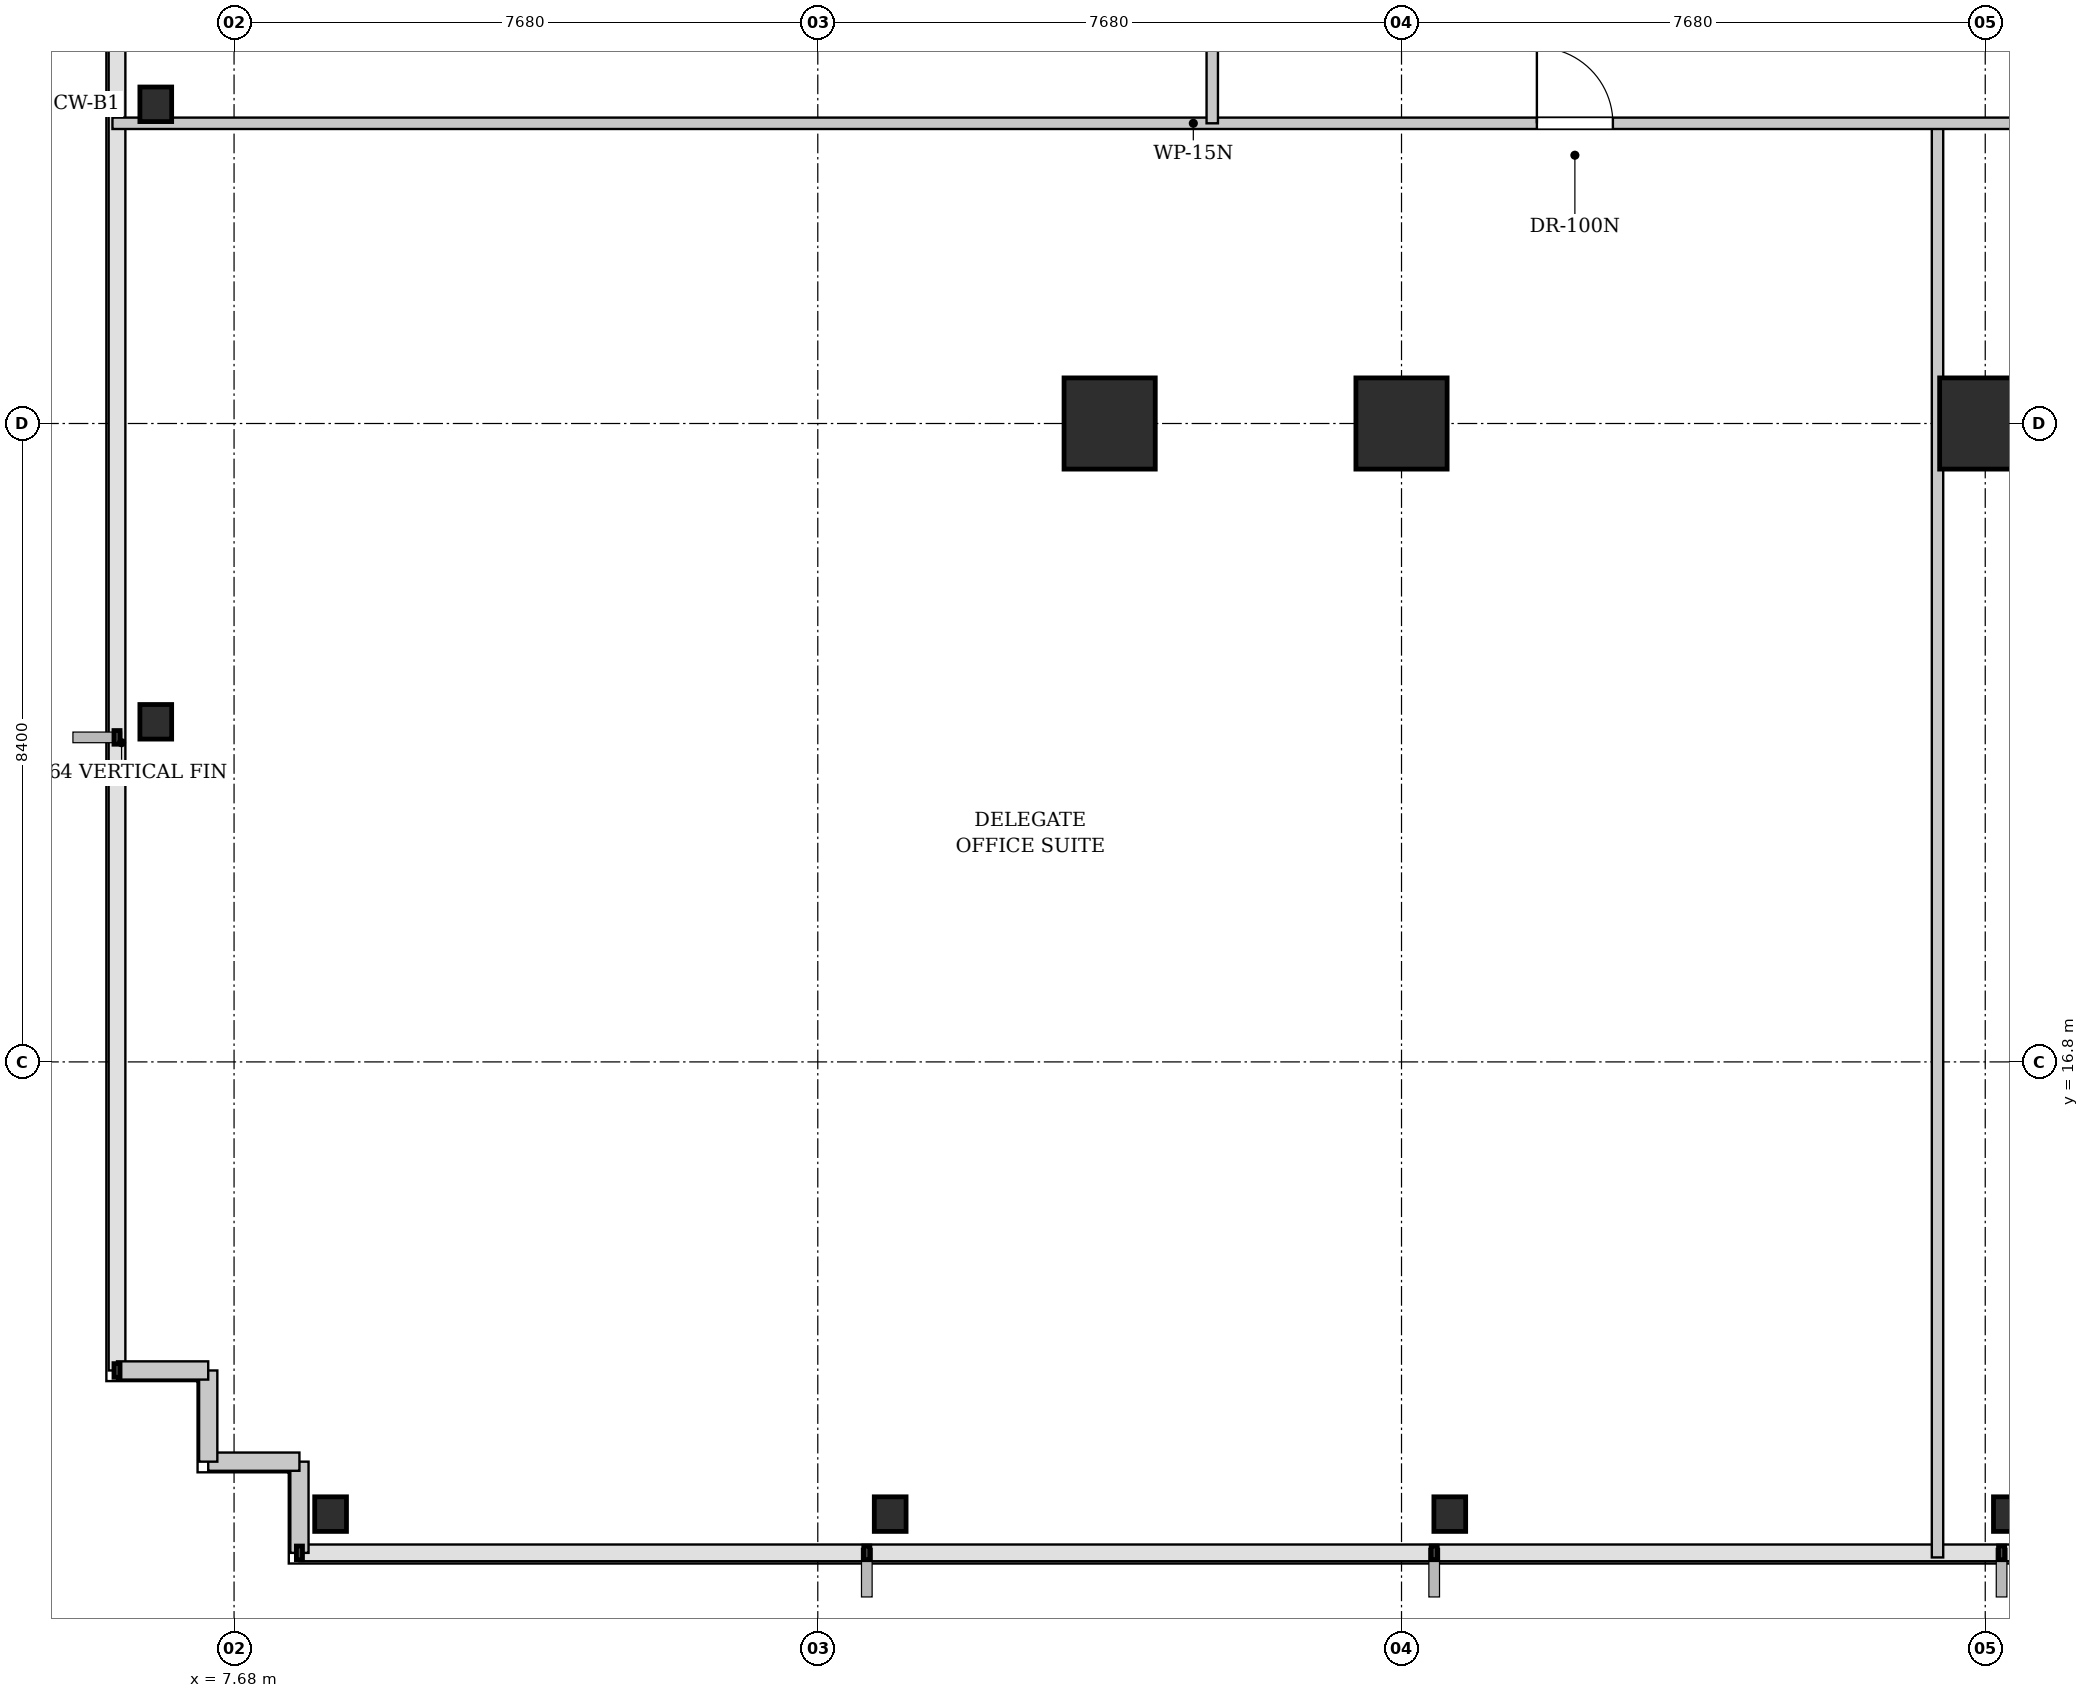
"""IFC4 building model, lengths in metres.
Left out: names, types, materials, properties, quantities, classifications, styles, units other than length and angle.
Written with IfcOpenShell. Run it as: python <this file> out.ifc"""

import sys

from ifc_helpers import new_model, si_unit, direction, frame, frame_2d, origin, origin_2d, place, context, subcontext, project, spatial, rectangle, i_section, extrude, element, fill, save


model = new_model("IFC4")
c1 = context("Model", 3, precision=1e-05, world=origin(), true_north=direction((0.0, 1.0)))
c2 = subcontext(c1, "Body", "Model", "MODEL_VIEW")
j1 = project(units=[si_unit("LENGTHUNIT", "METRE"), si_unit("PLANEANGLEUNIT", "RADIAN")], contexts=[c1])
p1 = place(None, origin())
s1 = spatial("IfcSite", under=j1, at=p1, CompositionType="ELEMENT")
p2 = place(p1, origin())
s2 = spatial("IfcBuilding", under=s1, at=p2, CompositionType="ELEMENT")
p3 = place(p2, frame((0.0, 0.0, 64.4)))
s3 = spatial("IfcBuildingStorey", under=s2, at=p3, CompositionType="ELEMENT", Elevation=64.4)
for number, where, z_axis, x_axis in (
    (1, (23.04, 25.2, 0.0), (0.0, 0.0, 1.0), (1.0, 0.0, 0.0)),
    (2, (30.72, 25.2, 0.0), (0.0, 0.0, 1.0), (1.0, 0.0, 0.0)),
    (3, (19.2, 25.2, 0.0), (0.0, 0.0, 1.0), (1.0, 0.0, 0.0)),
):
    element("IfcColumn", number, at=place(p3, frame(where, z_axis=z_axis, x_axis=x_axis)), inside=s3, PredefinedType="COLUMN", context=c2, shape_type="SweptSolid", body=[
        extrude(rectangle(XDim=1.2, YDim=1.2, at=origin_2d()), origin(), (0.0, 0.0, 1.0), 3.4),
    ])
for number, where, z_axis, x_axis in (
    (4, (8.95, 10.85, 0.0), (0.0, 0.0, 1.0), (1.0, 0.0, 0.0)),
    (5, (16.312, 10.85, 0.0), (0.0, 0.0, 1.0), (1.0, 0.0, 0.0)),
    (6, (23.675, 10.85, 0.0), (0.0, 0.0, 1.0), (1.0, 0.0, 0.0)),
    (7, (31.038, 10.85, 0.0), (0.0, 0.0, 1.0), (1.0, 0.0, 0.0)),
    (8, (6.65, 21.275, 0.0), (0.0, 0.0, 1.0), (1.0, 0.0, 0.0)),
    (9, (6.65, 29.4, 0.0), (0.0, 0.0, 1.0), (1.0, 0.0, 0.0)),
):
    element("IfcColumn", number, at=place(p3, frame(where, z_axis=z_axis, x_axis=x_axis)), inside=s3, PredefinedType="COLUMN", context=c2, shape_type="SweptSolid", body=[
        extrude(i_section(OverallWidth=0.418, OverallDepth=0.455, WebThickness=0.042, FlangeThickness=0.068, FilletRadius=0.015, at=origin_2d()), origin(), (0.0, 0.0, 1.0), 3.4),
    ])
for number, where, z_axis, x_axis in (
    (10, (8.54, 10.34, 0.0), (0.0, 0.0, 1.0), (0.0, 1.0, 0.0)),
    (11, (8.54, 11.54, 0.0), (0.0, 0.0, 1.0), (-1.0, 0.0, 0.0)),
    (12, (7.34, 11.54, 0.0), (0.0, 0.0, 1.0), (0.0, 1.0, 0.0)),
):
    element("IfcWall", number, at=place(p3, frame(where, z_axis=z_axis, x_axis=x_axis)), inside=s3, PredefinedType="SOLIDWALL", context=c2, shape_type="SweptSolid", body=[
        extrude(rectangle(XDim=1.2, YDim=0.24, at=frame_2d((0.6, 0.0))), origin(), (0.0, 0.0, 1.0), 3.18),
    ])
p4 = place(p3, frame((7.34, 12.74, 0.0), z_axis=(0.0, 0.0, 1.0), x_axis=(-1.0, 0.0, 0.0)))
e13 = element("IfcWall", 13, at=p4, inside=s3, PredefinedType="SOLIDWALL", context=c2, shape_type="SweptSolid", body=[
    extrude(rectangle(XDim=1.2, YDim=0.24, at=frame_2d((0.6, 0.0))), origin(), (0.0, 0.0, 1.0), 3.18),
])
p5 = place(p3, frame((30.092, 10.28, 0.0), z_axis=(0.0, 0.0, 1.0), x_axis=(0.0, 1.0, 0.0)))
e14 = element("IfcWall", 14, at=p5, inside=s3, PredefinedType="PARTITIONING", context=c2, shape_type="SweptSolid", body=[
    extrude(rectangle(XDim=18.89, YDim=0.15, at=frame_2d((9.445, 0.0))), origin(), (0.0, 0.0, 1.0), 3.18),
])
p6 = place(p3, frame((6.08, 29.15, 0.0), z_axis=(0.0, 0.0, 1.0), x_axis=(1.0, 0.0, 0.0)))
e15 = element("IfcWall", 15, at=p6, inside=s3, PredefinedType="PARTITIONING", context=c2, shape_type="SweptSolid", body=[
    extrude(rectangle(XDim=64.64, YDim=0.15, at=frame_2d((32.32, 0.0))), origin(), (0.0, 0.0, 1.0), 3.18),
])
p7 = place(p6, frame((18.741, 0.0, 0.0)))
e16 = element("IfcOpeningElement", 16, at=p7, cuts=e15, PredefinedType="OPENING", context=c2, shape_type="SweptSolid", body=[
    extrude(rectangle(XDim=1.0, YDim=2.15, at=frame_2d((0.5, 1.075))), frame((0.0, 0.085, 0.0), z_axis=(0.0, -1.0, 0.0), x_axis=(1.0, 0.0, 0.0)), (0.0, 0.0, 1.0), 0.17),
])
p8 = place(p6, frame((29.245, 0.0, 0.0)))
e17 = element("IfcOpeningElement", 17, at=p8, cuts=e15, PredefinedType="OPENING", context=c2, shape_type="SweptSolid", body=[
    extrude(rectangle(XDim=1.0, YDim=2.15, at=frame_2d((0.5, 1.075))), frame((0.0, 0.085, 0.0), z_axis=(0.0, -1.0, 0.0), x_axis=(1.0, 0.0, 0.0)), (0.0, 0.0, 1.0), 0.17),
])
p9 = place(p6, frame((38.64, 0.0, 0.0)))
e18 = element("IfcOpeningElement", 18, at=p9, cuts=e15, PredefinedType="OPENING", context=c2, shape_type="SweptSolid", body=[
    extrude(rectangle(XDim=1.0, YDim=2.15, at=frame_2d((0.5, 1.075))), frame((0.0, 0.085, 0.0), z_axis=(0.0, -1.0, 0.0), x_axis=(1.0, 0.0, 0.0)), (0.0, 0.0, 1.0), 0.17),
])
p10 = place(p6, frame((46.011, 0.0, 0.0)))
e19 = element("IfcOpeningElement", 19, at=p10, cuts=e15, PredefinedType="OPENING", context=c2, shape_type="SweptSolid", body=[
    extrude(rectangle(XDim=1.0, YDim=2.15, at=frame_2d((0.5, 1.075))), frame((0.0, 0.085, 0.0), z_axis=(0.0, -1.0, 0.0), x_axis=(1.0, 0.0, 0.0)), (0.0, 0.0, 1.0), 0.17),
])
p11 = place(p3, frame((20.55, 29.15, 0.0), z_axis=(0.0, 0.0, 1.0), x_axis=(0.0, 1.0, 0.0)))
e20 = element("IfcWall", 20, at=p11, inside=s3, PredefinedType="PARTITIONING", context=c2, shape_type="SweptSolid", body=[
    extrude(rectangle(XDim=19.37, YDim=0.15, at=frame_2d((9.685, 0.0))), origin(), (0.0, 0.0, 1.0), 3.18),
])
p12 = place(p11, frame((1.03, 0.0, 0.0)))
e21 = element("IfcOpeningElement", 21, at=p12, cuts=e20, PredefinedType="OPENING", context=c2, shape_type="SweptSolid", body=[
    extrude(rectangle(XDim=0.9, YDim=2.15, at=frame_2d((0.45, 1.075))), frame((0.0, 0.085, 0.0), z_axis=(0.0, -1.0, 0.0), x_axis=(1.0, 0.0, 0.0)), (0.0, 0.0, 1.0), 0.17),
])
p13 = place(p7, origin())
e22 = element("IfcDoor", 22, at=p13, inside=s3, OperationType="SINGLE_SWING_LEFT", PredefinedType="DOOR", context=c2, shape_type="SweptSolid", body=[
    extrude(rectangle(XDim=1.0, YDim=2.15, at=frame_2d((0.5, 1.075))), frame((0.0, 0.025, 0.0), z_axis=(0.0, -1.0, 0.0), x_axis=(1.0, 0.0, 0.0)), (0.0, 0.0, 1.0), 0.05),
])
fill(e16, e22)
save(model, sys.argv[1])
